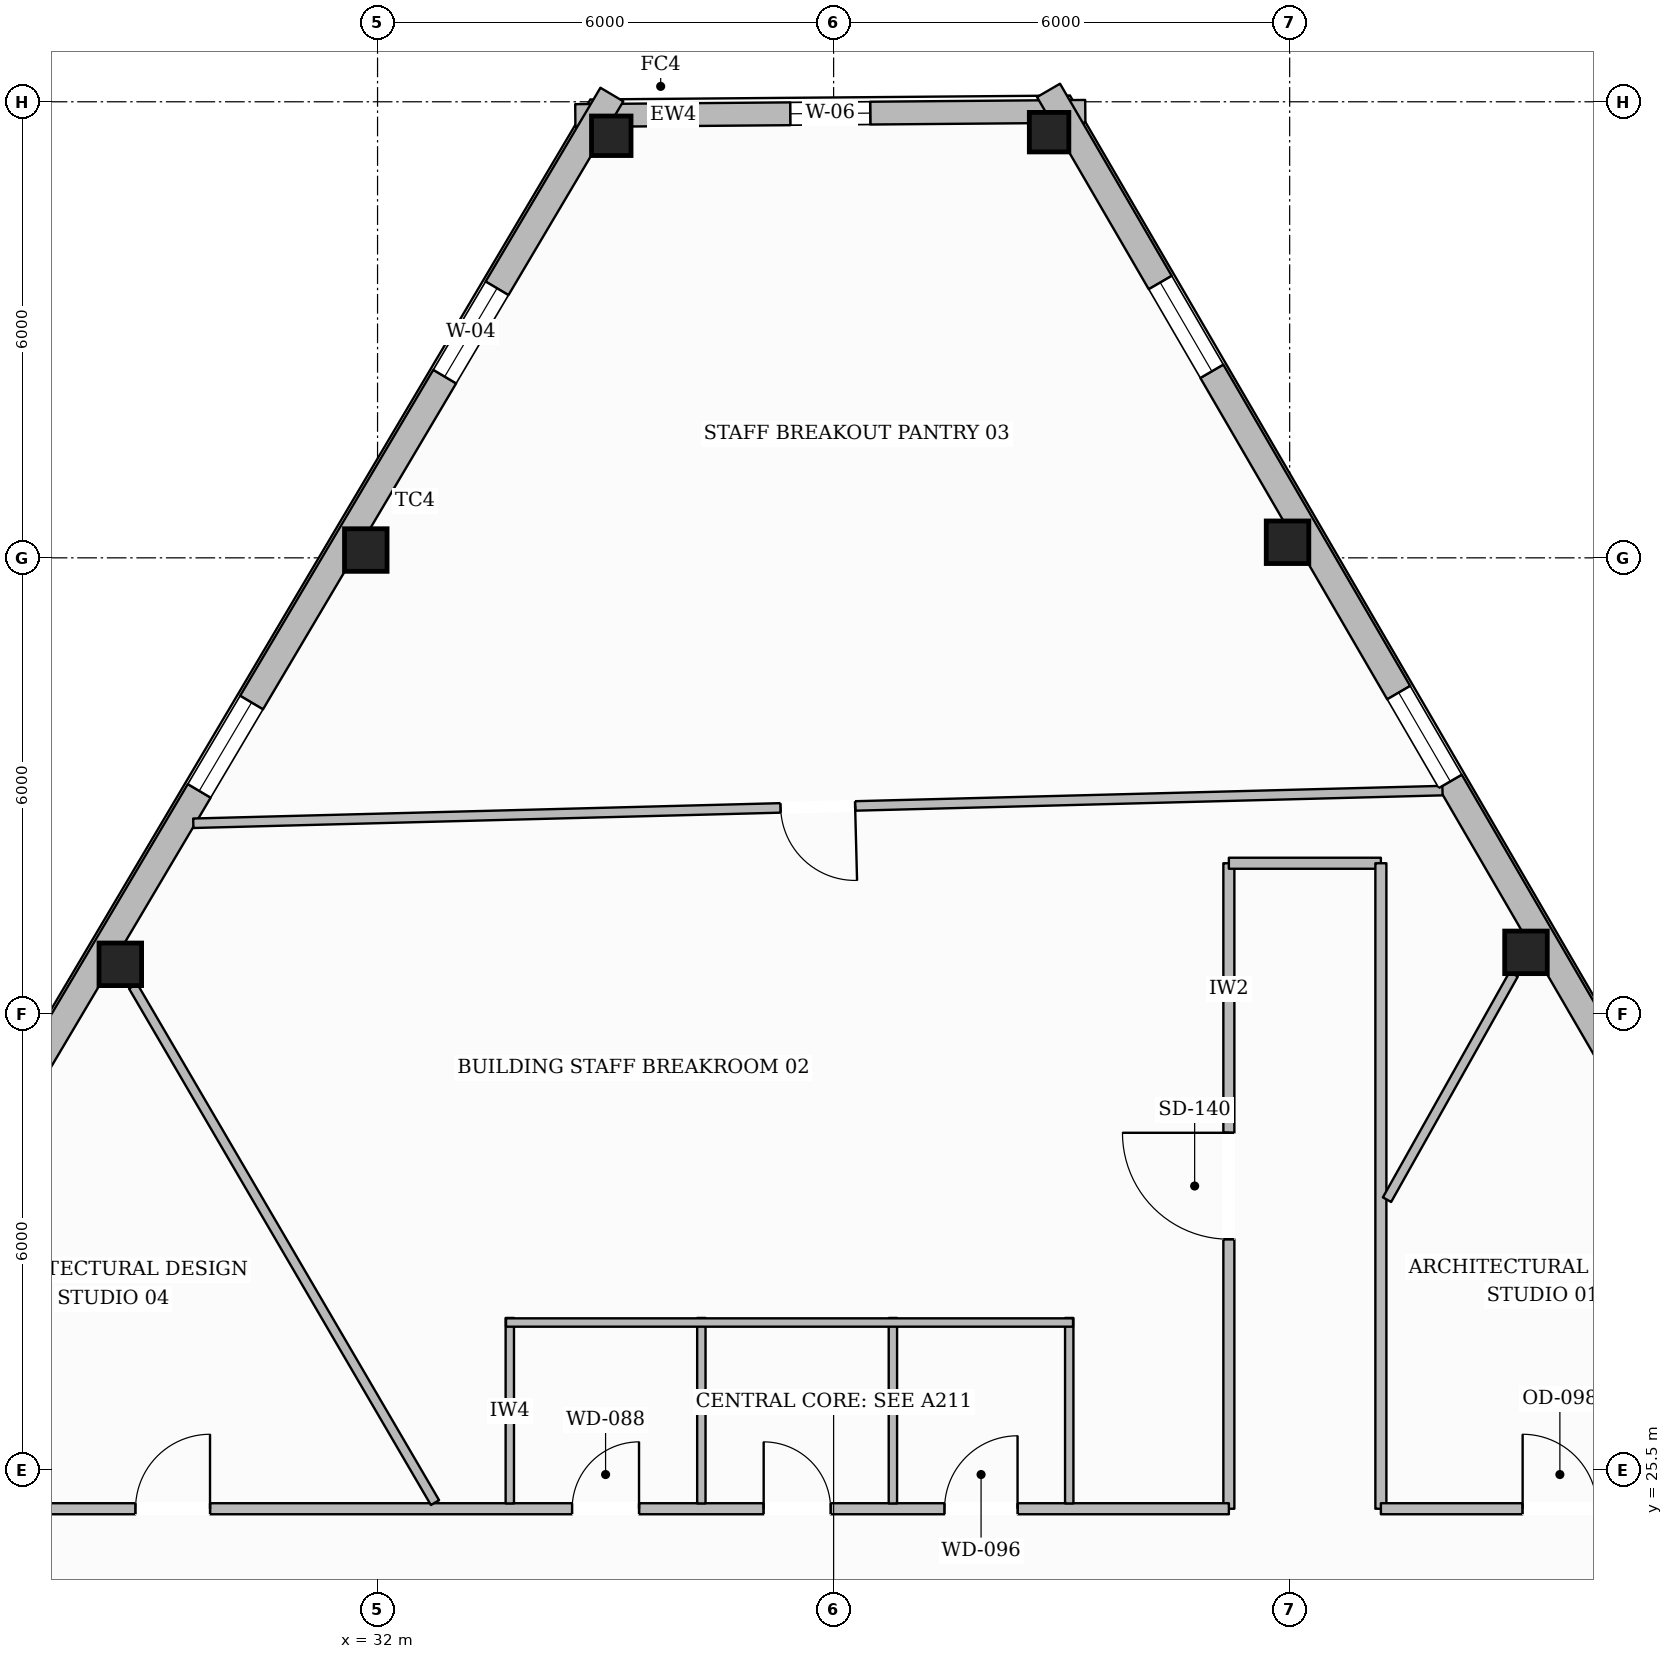
"""IFC4 building model, lengths in metres.
Left out: names, types, materials, properties, quantities, classifications, styles, units other than length and angle.
Written with IfcOpenShell. Run it as: python <this file> out.ifc"""

import sys

from ifc_helpers import new_model, si_unit, direction, frame, frame_2d, origin, origin_2d, place, context, subcontext, project, spatial, rectangle, hollow_rectangle, extrude, element, fill, save


model = new_model("IFC4")
c1 = context("Model", 3, precision=1e-05, world=origin(), true_north=direction((0.0, 1.0)))
c2 = subcontext(c1, "Body", "Model", "MODEL_VIEW")
j1 = project(units=[si_unit("LENGTHUNIT", "METRE"), si_unit("PLANEANGLEUNIT", "RADIAN")], contexts=[c1])
p1 = place(None, origin())
s1 = spatial("IfcSite", under=j1, at=p1, CompositionType="ELEMENT")
p2 = place(p1, origin())
s2 = spatial("IfcBuilding", under=s1, at=p2, CompositionType="ELEMENT")
p3 = place(p2, frame((0.0, 0.0, 281.85)))
s3 = spatial("IfcBuildingStorey", under=s2, at=p3, CompositionType="ELEMENT", Elevation=281.85)
p4 = place(p3, frame((35.075, 43.052, 0.0), z_axis=(0.0, 0.0, 1.0), x_axis=(1.0, 0.0, 0.0)))
e1 = element("IfcColumn", 1, at=p4, inside=s3, PredefinedType="COLUMN", context=c2, shape_type="SweptSolid", body=[
    extrude(hollow_rectangle(XDim=0.52, YDim=0.52, WallThickness=0.024, at=origin_2d()), origin(), (0.0, 0.0, 1.0), 3.61),
])
for number, where, z_axis, x_axis in (
    (2, (31.845, 37.603, 0.0), (0.0, 0.0, 1.0), (1.0, 0.0, 0.0)),
    (3, (28.616, 32.153, 0.0), (0.0, 0.0, 1.0), (1.0, 0.0, 0.0)),
    (4, (47.109, 32.31, 0.0), (0.0, 0.0, 1.0), (1.0, 0.0, 0.0)),
    (5, (43.972, 37.705, 0.0), (0.0, 0.0, 1.0), (1.0, 0.0, 0.0)),
):
    element("IfcColumn", number, at=place(p3, frame(where, z_axis=z_axis, x_axis=x_axis)), inside=s3, PredefinedType="COLUMN", context=c2, shape_type="SweptSolid", body=[
        extrude(hollow_rectangle(XDim=0.56, YDim=0.56, WallThickness=0.025, at=origin_2d()), origin(), (0.0, 0.0, 1.0), 3.61),
    ])
p5 = place(p3, frame((40.835, 43.1, 0.0), z_axis=(0.0, 0.0, 1.0), x_axis=(1.0, 0.0, 0.0)))
e6 = element("IfcColumn", 6, at=p5, inside=s3, PredefinedType="COLUMN", context=c2, shape_type="SweptSolid", body=[
    extrude(hollow_rectangle(XDim=0.52, YDim=0.52, WallThickness=0.024, at=origin_2d()), origin(), (0.0, 0.0, 1.0), 3.61),
])
p6 = place(p3, frame((34.602, 43.319, 0.0), z_axis=(0.0, 0.0, 1.0), x_axis=(0.999965888342, 0.008259670208, 0.0)))
e7 = element("IfcWall", 7, at=p6, inside=s3, PredefinedType="STANDARD", context=c2, shape_type="SweptSolid", body=[
    extrude(rectangle(XDim=6.71, YDim=0.3, at=frame_2d((3.355, 0.0))), origin(), (0.0, 0.0, 1.0), 3.196),
])
p7 = place(p6, frame((2.83, 0.0, 0.65)))
e8 = element("IfcOpeningElement", 8, at=p7, cuts=e7, PredefinedType="OPENING", context=c2, shape_type="SweptSolid", body=[
    extrude(rectangle(XDim=1.05, YDim=1.7, at=frame_2d((0.525, 0.85))), frame((0.0, 0.16, 0.0), z_axis=(0.0, -1.0, 0.0), x_axis=(1.0, 0.0, 0.0)), (0.0, 0.0, 1.0), 0.32),
])
p8 = place(p3, frame((15.219, 10.076, 0.0), z_axis=(0.0, 0.0, 1.0), x_axis=(0.509799642177, 0.860293162147, 0.0)))
e9 = element("IfcWall", 9, at=p8, inside=s3, PredefinedType="STANDARD", context=c2, shape_type="SweptSolid", body=[
    extrude(rectangle(XDim=38.963, YDim=0.35, at=frame_2d((19.481, 0.0))), origin(), (0.0, 0.0, 1.0), 3.196),
])
p9 = place(p8, frame((34.65, 0.0, 0.65)))
e10 = element("IfcOpeningElement", 10, at=p9, cuts=e9, PredefinedType="OPENING", context=c2, shape_type="SweptSolid", body=[
    extrude(rectangle(XDim=1.35, YDim=1.75, at=frame_2d((0.675, 0.875))), frame((0.0, 0.185, 0.0), z_axis=(0.0, -1.0, 0.0), x_axis=(1.0, 0.0, 0.0)), (0.0, 0.0, 1.0), 0.37),
])
p10 = place(p8, frame((28.314, 0.0, 0.65)))
e11 = element("IfcOpeningElement", 11, at=p10, cuts=e9, PredefinedType="OPENING", context=c2, shape_type="SweptSolid", body=[
    extrude(rectangle(XDim=1.35, YDim=1.75, at=frame_2d((0.675, 0.875))), frame((0.0, 0.185, 0.0), z_axis=(0.0, -1.0, 0.0), x_axis=(1.0, 0.0, 0.0)), (0.0, 0.0, 1.0), 0.37),
])
p11 = place(p8, frame((15.645, 0.0, 0.65)))
e12 = element("IfcOpeningElement", 12, at=p11, cuts=e9, PredefinedType="OPENING", context=c2, shape_type="SweptSolid", body=[
    extrude(rectangle(XDim=1.35, YDim=1.75, at=frame_2d((0.675, 0.875))), frame((0.0, 0.185, 0.0), z_axis=(0.0, -1.0, 0.0), x_axis=(1.0, 0.0, 0.0)), (0.0, 0.0, 1.0), 0.37),
])
p12 = place(p8, frame((9.309, 0.0, 0.65)))
e13 = element("IfcOpeningElement", 13, at=p12, cuts=e9, PredefinedType="OPENING", context=c2, shape_type="SweptSolid", body=[
    extrude(rectangle(XDim=1.35, YDim=1.75, at=frame_2d((0.675, 0.875))), frame((0.0, 0.185, 0.0), z_axis=(0.0, -1.0, 0.0), x_axis=(1.0, 0.0, 0.0)), (0.0, 0.0, 1.0), 0.37),
])
p13 = place(p8, frame((2.974, 0.0, 0.65)))
e14 = element("IfcOpeningElement", 14, at=p13, cuts=e9, PredefinedType="OPENING", context=c2, shape_type="SweptSolid", body=[
    extrude(rectangle(XDim=1.35, YDim=1.75, at=frame_2d((0.675, 0.875))), frame((0.0, 0.185, 0.0), z_axis=(0.0, -1.0, 0.0), x_axis=(1.0, 0.0, 0.0)), (0.0, 0.0, 1.0), 0.37),
])
p14 = place(p3, frame((40.827, 43.65, 0.0), z_axis=(0.0, 0.0, 1.0), x_axis=(0.502670175865, -0.864478278672, 0.0)))
e15 = element("IfcWall", 15, at=p14, inside=s3, PredefinedType="STANDARD", context=c2, shape_type="SweptSolid", body=[
    extrude(rectangle(XDim=38.406, YDim=0.35, at=frame_2d((19.203, 0.0))), origin(), (0.0, 0.0, 1.0), 3.196),
])
p15 = place(p14, frame((34.128, 0.0, 0.65)))
e16 = element("IfcOpeningElement", 16, at=p15, cuts=e15, PredefinedType="OPENING", context=c2, shape_type="SweptSolid", body=[
    extrude(rectangle(XDim=1.35, YDim=1.75, at=frame_2d((0.675, 0.875))), frame((0.0, 0.185, 0.0), z_axis=(0.0, -1.0, 0.0), x_axis=(1.0, 0.0, 0.0)), (0.0, 0.0, 1.0), 0.37),
])
p16 = place(p14, frame((27.888, 0.0, 0.65)))
e17 = element("IfcOpeningElement", 17, at=p16, cuts=e15, PredefinedType="OPENING", context=c2, shape_type="SweptSolid", body=[
    extrude(rectangle(XDim=1.35, YDim=1.75, at=frame_2d((0.675, 0.875))), frame((0.0, 0.185, 0.0), z_axis=(0.0, -1.0, 0.0), x_axis=(1.0, 0.0, 0.0)), (0.0, 0.0, 1.0), 0.37),
])
p17 = place(p14, frame((15.406, 0.0, 0.65)))
e18 = element("IfcOpeningElement", 18, at=p17, cuts=e15, PredefinedType="OPENING", context=c2, shape_type="SweptSolid", body=[
    extrude(rectangle(XDim=1.35, YDim=1.75, at=frame_2d((0.675, 0.875))), frame((0.0, 0.185, 0.0), z_axis=(0.0, -1.0, 0.0), x_axis=(1.0, 0.0, 0.0)), (0.0, 0.0, 1.0), 0.37),
])
p18 = place(p14, frame((9.165, 0.0, 0.65)))
e19 = element("IfcOpeningElement", 19, at=p18, cuts=e15, PredefinedType="OPENING", context=c2, shape_type="SweptSolid", body=[
    extrude(rectangle(XDim=1.35, YDim=1.75, at=frame_2d((0.675, 0.875))), frame((0.0, 0.185, 0.0), z_axis=(0.0, -1.0, 0.0), x_axis=(1.0, 0.0, 0.0)), (0.0, 0.0, 1.0), 0.37),
])
p19 = place(p14, frame((2.924, 0.0, 0.65)))
e20 = element("IfcOpeningElement", 20, at=p19, cuts=e15, PredefinedType="OPENING", context=c2, shape_type="SweptSolid", body=[
    extrude(rectangle(XDim=1.35, YDim=1.75, at=frame_2d((0.675, 0.875))), frame((0.0, 0.185, 0.0), z_axis=(0.0, -1.0, 0.0), x_axis=(1.0, 0.0, 0.0)), (0.0, 0.0, 1.0), 0.37),
])
p20 = place(p3, frame((43.2, 24.99, 0.0), z_axis=(0.0, 0.0, 1.0), x_axis=(0.0, 1.0, 0.0)))
e21 = element("IfcWall", 21, at=p20, inside=s3, PredefinedType="PARTITIONING", context=c2, shape_type="SweptSolid", body=[
    extrude(rectangle(XDim=8.492, YDim=0.145, at=frame_2d((4.246, 0.0))), origin(), (0.0, 0.0, 1.0), 3.61),
])
p21 = place(p20, frame((3.546, 0.0, 0.0)))
e22 = element("IfcOpeningElement", 22, at=p21, cuts=e21, PredefinedType="OPENING", context=c2, shape_type="SweptSolid", body=[
    extrude(rectangle(XDim=1.4, YDim=2.2, at=frame_2d((0.7, 1.1))), frame((0.0, 0.083, 0.0), z_axis=(0.0, -1.0, 0.0), x_axis=(1.0, 0.0, 0.0)), (0.0, 0.0, 1.0), 0.165),
])
p22 = place(p3, frame((43.2, 33.482, 0.0), z_axis=(0.0, 0.0, 1.0), x_axis=(1.0, 0.0, 0.0)))
e23 = element("IfcWall", 23, at=p22, inside=s3, PredefinedType="PARTITIONING", context=c2, shape_type="SweptSolid", body=[
    extrude(rectangle(XDim=2.0, YDim=0.145, at=frame_2d((1.0, 0.0))), origin(), (0.0, 0.0, 1.0), 3.61),
])
p23 = place(p3, frame((45.2, 33.482, 0.0), z_axis=(0.0, 0.0, 1.0), x_axis=(0.0, -1.0, 0.0)))
e24 = element("IfcWall", 24, at=p23, inside=s3, PredefinedType="PARTITIONING", context=c2, shape_type="SweptSolid", body=[
    extrude(rectangle(XDim=8.492, YDim=0.145, at=frame_2d((4.246, 0.0))), origin(), (0.0, 0.0, 1.0), 3.61),
])
p24 = place(p3, frame((45.2, 24.99, 0.0), z_axis=(0.0, 0.0, 1.0), x_axis=(1.0, 0.0, 0.0)))
e25 = element("IfcWall", 25, at=p24, inside=s3, PredefinedType="PARTITIONING", context=c2, shape_type="SweptSolid", body=[
    extrude(rectangle(XDim=4.71, YDim=0.145, at=frame_2d((2.355, 0.0))), origin(), (0.0, 0.0, 1.0), 3.61),
])
p25 = place(p24, frame((1.865, 0.0, 0.0)))
e26 = element("IfcOpeningElement", 26, at=p25, cuts=e25, PredefinedType="OPENING", context=c2, shape_type="SweptSolid", body=[
    extrude(rectangle(XDim=0.98, YDim=2.15, at=frame_2d((0.49, 1.075))), frame((0.0, 0.083, 0.0), z_axis=(0.0, -1.0, 0.0), x_axis=(1.0, 0.0, 0.0)), (0.0, 0.0, 1.0), 0.165),
])
p26 = place(p3, frame((26.09, 24.99, 0.0), z_axis=(0.0, 0.0, 1.0), x_axis=(1.0, 0.0, 0.0)))
e27 = element("IfcWall", 27, at=p26, inside=s3, PredefinedType="PARTITIONING", context=c2, shape_type="SweptSolid", body=[
    extrude(rectangle(XDim=17.11, YDim=0.145, at=frame_2d((8.555, 0.0))), origin(), (0.0, 0.0, 1.0), 3.61),
])
p27 = place(p26, frame((8.47, 0.0, 0.0)))
e28 = element("IfcOpeningElement", 28, at=p27, cuts=e27, PredefinedType="OPENING", context=c2, shape_type="SweptSolid", body=[
    extrude(rectangle(XDim=0.88, YDim=2.1, at=frame_2d((0.44, 1.05))), frame((0.0, 0.083, 0.0), z_axis=(0.0, -1.0, 0.0), x_axis=(1.0, 0.0, 0.0)), (0.0, 0.0, 1.0), 0.165),
])
p28 = place(p26, frame((10.99, 0.0, 0.0)))
e29 = element("IfcOpeningElement", 29, at=p28, cuts=e27, PredefinedType="OPENING", context=c2, shape_type="SweptSolid", body=[
    extrude(rectangle(XDim=0.88, YDim=2.1, at=frame_2d((0.44, 1.05))), frame((0.0, 0.083, 0.0), z_axis=(0.0, -1.0, 0.0), x_axis=(1.0, 0.0, 0.0)), (0.0, 0.0, 1.0), 0.165),
])
p29 = place(p26, frame((13.37, 0.0, 0.0)))
e30 = element("IfcOpeningElement", 30, at=p29, cuts=e27, PredefinedType="OPENING", context=c2, shape_type="SweptSolid", body=[
    extrude(rectangle(XDim=0.96, YDim=2.1, at=frame_2d((0.48, 1.05))), frame((0.0, 0.083, 0.0), z_axis=(0.0, -1.0, 0.0), x_axis=(1.0, 0.0, 0.0)), (0.0, 0.0, 1.0), 0.165),
])
p30 = place(p26, frame((2.726, 0.0, 0.0)))
e31 = element("IfcOpeningElement", 31, at=p30, cuts=e27, PredefinedType="OPENING", context=c2, shape_type="SweptSolid", body=[
    extrude(rectangle(XDim=0.98, YDim=2.15, at=frame_2d((0.49, 1.075))), frame((0.0, 0.083, 0.0), z_axis=(0.0, -1.0, 0.0), x_axis=(1.0, 0.0, 0.0)), (0.0, 0.0, 1.0), 0.165),
])
for number, where, z_axis, x_axis in (
    (32, (33.74, 25.06, 0.0), (0.0, 0.0, 1.0), (0.0, 1.0, 0.0)),
    (33, (36.26, 25.06, 0.0), (0.0, 0.0, 1.0), (0.0, 1.0, 0.0)),
    (34, (38.78, 25.06, 0.0), (0.0, 0.0, 1.0), (0.0, 1.0, 0.0)),
    (35, (41.1, 25.06, 0.0), (0.0, 0.0, 1.0), (0.0, 1.0, 0.0)),
):
    element("IfcWall", number, at=place(p3, frame(where, z_axis=z_axis, x_axis=x_axis)), inside=s3, PredefinedType="PLUMBINGWALL", context=c2, shape_type="SweptSolid", body=[
        extrude(rectangle(XDim=2.44, YDim=0.11, at=frame_2d((1.22, 0.0))), origin(), (0.0, 0.0, 1.0), 3.61),
    ])
p31 = place(p3, frame((33.69, 27.44, 0.0), z_axis=(0.0, 0.0, 1.0), x_axis=(1.0, 0.0, 0.0)))
e36 = element("IfcWall", 36, at=p31, inside=s3, PredefinedType="PLUMBINGWALL", context=c2, shape_type="SweptSolid", body=[
    extrude(rectangle(XDim=7.46, YDim=0.11, at=frame_2d((3.73, 0.0))), origin(), (0.0, 0.0, 1.0), 3.61),
])
p32 = place(p3, frame((45.281, 29.056, 0.0), z_axis=(0.0, 0.0, 1.0), x_axis=(0.489889843692, 0.871784343199, 0.0)))
e37 = element("IfcWall", 37, at=p32, inside=s3, PredefinedType="PARTITIONING", context=c2, shape_type="SweptSolid", body=[
    extrude(rectangle(XDim=3.402, YDim=0.125, at=frame_2d((1.701, 0.0))), origin(), (0.0, 0.0, 1.0), 3.61),
])
p33 = place(p3, frame((32.756, 25.071, 0.0), z_axis=(0.0, 0.0, 1.0), x_axis=(-0.50468093624, 0.863305943797, 0.0)))
e38 = element("IfcWall", 38, at=p33, inside=s3, PredefinedType="PARTITIONING", context=c2, shape_type="SweptSolid", body=[
    extrude(rectangle(XDim=7.87, YDim=0.125, at=frame_2d((3.935, 0.0))), origin(), (0.0, 0.0, 1.0), 3.246),
])
p34 = place(p3, frame((46.01, 34.438, 0.0), z_axis=(0.0, 0.0, 1.0), x_axis=(-0.999657997506, -0.026151252802, 0.0)))
e39 = element("IfcWall", 39, at=p34, inside=s3, PredefinedType="PARTITIONING", context=c2, shape_type="SweptSolid", body=[
    extrude(rectangle(XDim=16.44, YDim=0.125, at=frame_2d((8.22, 0.0))), origin(), (0.0, 0.0, 1.0), 3.61),
])
p35 = place(p34, frame((7.73, 0.0, 0.0)))
e40 = element("IfcOpeningElement", 40, at=p35, cuts=e39, PredefinedType="OPENING", context=c2, shape_type="SweptSolid", body=[
    extrude(rectangle(XDim=0.98, YDim=2.15, at=frame_2d((0.49, 1.075))), frame((0.0, 0.073, 0.0), z_axis=(0.0, -1.0, 0.0), x_axis=(1.0, 0.0, 0.0)), (0.0, 0.0, 1.0), 0.145),
])
p36 = place(p9, origin())
e41 = element("IfcWindow", 41, at=p36, inside=s3, PartitioningType="SINGLE_PANEL", PredefinedType="WINDOW", context=c2, shape_type="SweptSolid", body=[
    extrude(rectangle(XDim=1.35, YDim=1.75, at=frame_2d((0.675, 0.875))), frame((0.0, 0.03, 0.0), z_axis=(0.0, -1.0, 0.0), x_axis=(1.0, 0.0, 0.0)), (0.0, 0.0, 1.0), 0.06),
])
fill(e10, e41)
p37 = place(p10, origin())
e42 = element("IfcWindow", 42, at=p37, inside=s3, PartitioningType="SINGLE_PANEL", PredefinedType="WINDOW", context=c2, shape_type="SweptSolid", body=[
    extrude(rectangle(XDim=1.35, YDim=1.75, at=frame_2d((0.675, 0.875))), frame((0.0, 0.03, 0.0), z_axis=(0.0, -1.0, 0.0), x_axis=(1.0, 0.0, 0.0)), (0.0, 0.0, 1.0), 0.06),
])
fill(e11, e42)
p38 = place(p18, origin())
e43 = element("IfcWindow", 43, at=p38, inside=s3, PartitioningType="SINGLE_PANEL", PredefinedType="WINDOW", context=c2, shape_type="SweptSolid", body=[
    extrude(rectangle(XDim=1.35, YDim=1.75, at=frame_2d((0.675, 0.875))), frame((0.0, 0.03, 0.0), z_axis=(0.0, -1.0, 0.0), x_axis=(1.0, 0.0, 0.0)), (0.0, 0.0, 1.0), 0.06),
])
fill(e19, e43)
p39 = place(p19, origin())
e44 = element("IfcWindow", 44, at=p39, inside=s3, PartitioningType="SINGLE_PANEL", PredefinedType="WINDOW", context=c2, shape_type="SweptSolid", body=[
    extrude(rectangle(XDim=1.35, YDim=1.75, at=frame_2d((0.675, 0.875))), frame((0.0, 0.03, 0.0), z_axis=(0.0, -1.0, 0.0), x_axis=(1.0, 0.0, 0.0)), (0.0, 0.0, 1.0), 0.06),
])
fill(e20, e44)
p40 = place(p7, origin())
e45 = element("IfcWindow", 45, at=p40, inside=s3, PartitioningType="SINGLE_PANEL", PredefinedType="WINDOW", context=c2, shape_type="SweptSolid", body=[
    extrude(rectangle(XDim=1.05, YDim=1.7, at=frame_2d((0.525, 0.85))), frame((0.0, 0.03, 0.0), z_axis=(0.0, -1.0, 0.0), x_axis=(1.0, 0.0, 0.0)), (0.0, 0.0, 1.0), 0.06),
])
fill(e8, e45)
p41 = place(p27, origin())
e46 = element("IfcDoor", 46, at=p41, inside=s3, OperationType="SINGLE_SWING_RIGHT", PredefinedType="DOOR", context=c2, shape_type="SweptSolid", body=[
    extrude(rectangle(XDim=0.88, YDim=2.1, at=frame_2d((0.44, 1.05))), frame((0.0, 0.025, 0.0), z_axis=(0.0, -1.0, 0.0), x_axis=(1.0, 0.0, 0.0)), (0.0, 0.0, 1.0), 0.05),
])
fill(e28, e46)
p42 = place(p28, origin())
e47 = element("IfcDoor", 47, at=p42, inside=s3, OperationType="SINGLE_SWING_LEFT", PredefinedType="DOOR", context=c2, shape_type="SweptSolid", body=[
    extrude(rectangle(XDim=0.88, YDim=2.1, at=frame_2d((0.44, 1.05))), frame((0.0, 0.025, 0.0), z_axis=(0.0, -1.0, 0.0), x_axis=(1.0, 0.0, 0.0)), (0.0, 0.0, 1.0), 0.05),
])
fill(e29, e47)
p43 = place(p29, origin())
e48 = element("IfcDoor", 48, at=p43, inside=s3, OperationType="SINGLE_SWING_RIGHT", PredefinedType="DOOR", context=c2, shape_type="SweptSolid", body=[
    extrude(rectangle(XDim=0.96, YDim=2.1, at=frame_2d((0.48, 1.05))), frame((0.0, 0.025, 0.0), z_axis=(0.0, -1.0, 0.0), x_axis=(1.0, 0.0, 0.0)), (0.0, 0.0, 1.0), 0.05),
])
fill(e30, e48)
p44 = place(p25, origin())
e49 = element("IfcDoor", 49, at=p44, inside=s3, OperationType="SINGLE_SWING_LEFT", PredefinedType="DOOR", context=c2, shape_type="SweptSolid", body=[
    extrude(rectangle(XDim=0.98, YDim=2.15, at=frame_2d((0.49, 1.075))), frame((0.0, 0.025, 0.0), z_axis=(0.0, -1.0, 0.0), x_axis=(1.0, 0.0, 0.0)), (0.0, 0.0, 1.0), 0.05),
])
fill(e26, e49)
p45 = place(p21, origin())
e50 = element("IfcDoor", 50, at=p45, inside=s3, OperationType="SINGLE_SWING_RIGHT", PredefinedType="DOOR", context=c2, shape_type="SweptSolid", body=[
    extrude(rectangle(XDim=1.4, YDim=2.2, at=frame_2d((0.7, 1.1))), frame((0.0, 0.025, 0.0), z_axis=(0.0, -1.0, 0.0), x_axis=(1.0, 0.0, 0.0)), (0.0, 0.0, 1.0), 0.05),
])
fill(e22, e50)
p46 = place(p35, origin())
e51 = element("IfcDoor", 51, at=p46, inside=s3, OperationType="SINGLE_SWING_LEFT", PredefinedType="DOOR", context=c2, shape_type="SweptSolid", body=[
    extrude(rectangle(XDim=0.98, YDim=2.15, at=frame_2d((0.49, 1.075))), frame((0.0, 0.025, 0.0), z_axis=(0.0, -1.0, 0.0), x_axis=(1.0, 0.0, 0.0)), (0.0, 0.0, 1.0), 0.05),
])
fill(e40, e51)
p47 = place(p30, origin())
e52 = element("IfcDoor", 52, at=p47, inside=s3, OperationType="SINGLE_SWING_RIGHT", PredefinedType="DOOR", context=c2, shape_type="SweptSolid", body=[
    extrude(rectangle(XDim=0.98, YDim=2.15, at=frame_2d((0.49, 1.075))), frame((0.0, 0.025, 0.0), z_axis=(0.0, -1.0, 0.0), x_axis=(1.0, 0.0, 0.0)), (0.0, 0.0, 1.0), 0.05),
])
fill(e31, e52)
save(model, sys.argv[1])
